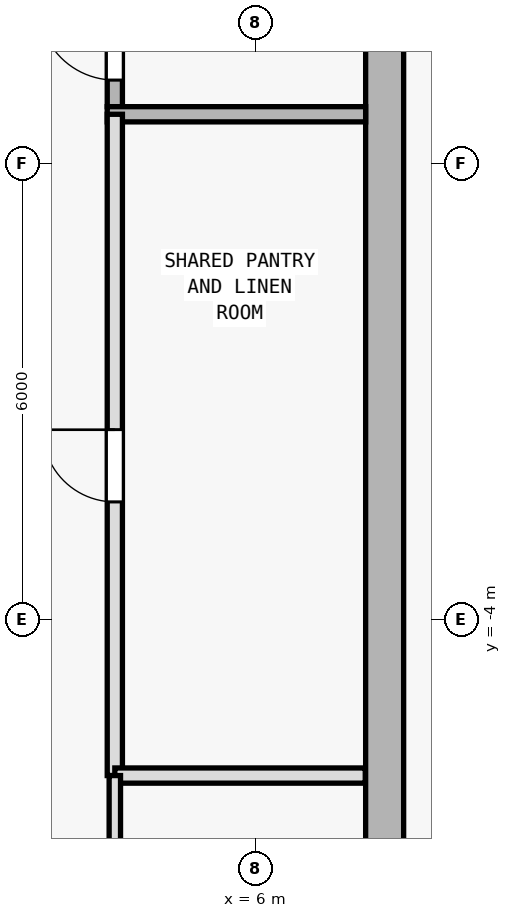
"""IFC4 building model, lengths in metres.
Left out: names, types, materials, properties, quantities, classifications, styles, units other than length and angle.
Written with IfcOpenShell. Run it as: python <this file> out.ifc"""

import sys

from ifc_helpers import new_model, si_unit, direction, frame, frame_2d, origin, origin_2d, place, context, subcontext, project, spatial, rectangle, i_section, extrude, element, fill, save


model = new_model("IFC4")
c1 = context("Model", 3, precision=1e-05, world=origin(), true_north=direction((0.0, 1.0)))
c2 = subcontext(c1, "Body", "Model", "MODEL_VIEW")
j1 = project(units=[si_unit("LENGTHUNIT", "METRE"), si_unit("PLANEANGLEUNIT", "RADIAN")], contexts=[c1])
p1 = place(None, origin())
s1 = spatial("IfcSite", under=j1, at=p1, CompositionType="ELEMENT")
p2 = place(p1, origin())
s2 = spatial("IfcBuilding", under=s1, at=p2, CompositionType="ELEMENT")
p3 = place(p2, frame((0.0, 0.0, 198.3)))
s3 = spatial("IfcBuildingStorey", under=s2, at=p3, CompositionType="ELEMENT", Elevation=198.3)
p4 = place(p3, frame((7.7, 0.4, 0.0), z_axis=(0.0, 0.0, 1.0), x_axis=(1.0, 0.0, 0.0)))
e1 = element("IfcColumn", 1, at=p4, inside=s3, PredefinedType="COLUMN", context=c2, shape_type="SweptSolid", body=[
    extrude(i_section(OverallWidth=0.398, OverallDepth=0.387, WebThickness=0.013, FlangeThickness=0.022, FilletRadius=0.015, at=origin_2d()), origin(), (0.0, 0.0, 1.0), 3.6),
])
p5 = place(p3, frame((7.7, 9.95, 0.0), z_axis=(0.0, 0.0, 1.0), x_axis=(0.0, -1.0, 0.0)))
e2 = element("IfcWall", 2, at=p5, inside=s3, PredefinedType="SHEAR", context=c2, shape_type="SweptSolid", body=[
    extrude(rectangle(XDim=19.1, YDim=0.5, at=frame_2d((9.55, 0.0))), origin(), (0.0, 0.0, 1.0), 3.35),
])
p6 = place(p3, frame((4.15, 2.75, 0.0), z_axis=(0.0, 0.0, 1.0), x_axis=(0.0, 1.0, 0.0)))
e3 = element("IfcWall", 3, at=p6, inside=s3, PredefinedType="SOLIDWALL", context=c2, shape_type="SweptSolid", body=[
    extrude(rectangle(XDim=7.2, YDim=0.2, at=frame_2d((3.6, 0.0))), origin(), (0.0, 0.0, 1.0), 3.35),
])
p7 = place(p6, frame((0.35, 0.0, 0.0)))
e4 = element("IfcOpeningElement", 4, at=p7, cuts=e3, PredefinedType="OPENING", context=c2, shape_type="SweptSolid", body=[
    extrude(rectangle(XDim=1.0, YDim=2.15, at=frame_2d((0.5, 1.075))), frame((0.0, 0.11, 0.0), z_axis=(0.0, -1.0, 0.0), x_axis=(1.0, 0.0, 0.0)), (0.0, 0.0, 1.0), 0.22),
])
p8 = place(p3, frame((4.05, 2.65, 0.0), z_axis=(0.0, 0.0, 1.0), x_axis=(1.0, 0.0, 0.0)))
e5 = element("IfcWall", 5, at=p8, inside=s3, PredefinedType="SOLIDWALL", context=c2, shape_type="SweptSolid", body=[
    extrude(rectangle(XDim=3.4, YDim=0.2, at=frame_2d((1.7, 0.0))), origin(), (0.0, 0.0, 1.0), 3.35),
])
p9 = place(p3, frame((4.15, -6.05, 0.0), z_axis=(0.0, 0.0, 1.0), x_axis=(0.0, 1.0, 0.0)))
e6 = element("IfcWall", 6, at=p9, inside=s3, PredefinedType="SOLIDWALL", context=c2, shape_type="SweptSolid", body=[
    extrude(rectangle(XDim=8.7, YDim=0.2, at=frame_2d((4.35, 0.0))), origin(), (0.0, 0.0, 1.0), 3.35),
])
p10 = place(p9, frame((3.6, 0.0, 0.0)))
e7 = element("IfcOpeningElement", 7, at=p10, cuts=e6, PredefinedType="OPENING", context=c2, shape_type="SweptSolid", body=[
    extrude(rectangle(XDim=0.95, YDim=2.1, at=frame_2d((0.475, 1.05))), frame((0.0, 0.11, 0.0), z_axis=(0.0, -1.0, 0.0), x_axis=(1.0, 0.0, 0.0)), (0.0, 0.0, 1.0), 0.22),
])
p11 = place(p3, frame((4.15, -6.05, 0.0), z_axis=(0.0, 0.0, 1.0), x_axis=(1.0, 0.0, 0.0)))
e8 = element("IfcWall", 8, at=p11, inside=s3, PredefinedType="SOLIDWALL", context=c2, shape_type="SweptSolid", body=[
    extrude(rectangle(XDim=3.295, YDim=0.2, at=frame_2d((1.647, 0.0))), origin(), (0.0, 0.0, 1.0), 3.35),
])
p12 = place(p3, frame((4.15, -9.145, 0.0), z_axis=(0.0, 0.0, 1.0), x_axis=(0.0, 1.0, 0.0)))
e9 = element("IfcWall", 9, at=p12, inside=s3, PredefinedType="PARTITIONING", context=c2, shape_type="SweptSolid", body=[
    extrude(rectangle(XDim=3.095, YDim=0.15, at=frame_2d((1.547, 0.0))), origin(), (0.0, 0.0, 1.0), 3.35),
])
p13 = place(p12, frame((0.845, 0.0, 0.0)))
e10 = element("IfcOpeningElement", 10, at=p13, cuts=e9, PredefinedType="OPENING", context=c2, shape_type="SweptSolid", body=[
    extrude(rectangle(XDim=0.9, YDim=2.1, at=frame_2d((0.45, 1.05))), frame((0.0, 0.085, 0.0), z_axis=(0.0, -1.0, 0.0), x_axis=(1.0, 0.0, 0.0)), (0.0, 0.0, 1.0), 0.17),
])
p14 = place(p7, origin())
e11 = element("IfcDoor", 11, at=p14, inside=s3, OperationType="SINGLE_SWING_RIGHT", PredefinedType="DOOR", context=c2, shape_type="SweptSolid", body=[
    extrude(rectangle(XDim=1.0, YDim=2.15, at=frame_2d((0.5, 1.075))), frame((0.0, 0.025, 0.0), z_axis=(0.0, -1.0, 0.0), x_axis=(1.0, 0.0, 0.0)), (0.0, 0.0, 1.0), 0.05),
])
fill(e4, e11)
p15 = place(p10, origin())
e12 = element("IfcDoor", 12, at=p15, inside=s3, OperationType="SINGLE_SWING_RIGHT", PredefinedType="DOOR", context=c2, shape_type="SweptSolid", body=[
    extrude(rectangle(XDim=0.95, YDim=2.1, at=frame_2d((0.475, 1.05))), frame((0.0, 0.025, 0.0), z_axis=(0.0, -1.0, 0.0), x_axis=(1.0, 0.0, 0.0)), (0.0, 0.0, 1.0), 0.05),
])
fill(e7, e12)
save(model, sys.argv[1])
